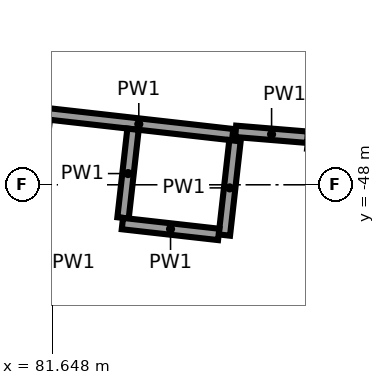
"""IFC4 building model, lengths in metres.
Left out: names, types, materials, properties, quantities, classifications, styles, units other than length and angle.
Written with IfcOpenShell. Run it as: python <this file> out.ifc"""

import sys

from ifc_helpers import new_model, si_unit, direction, frame, frame_2d, origin, place, context, subcontext, project, spatial, rectangle, extrude, element, save


model = new_model("IFC4")
c1 = context("Model", 3, precision=1e-05, world=origin(), true_north=direction((0.0, 1.0)))
c2 = subcontext(c1, "Body", "Model", "MODEL_VIEW")
j1 = project(units=[si_unit("LENGTHUNIT", "METRE"), si_unit("PLANEANGLEUNIT", "RADIAN")], contexts=[c1])
p1 = place(None, origin())
s1 = spatial("IfcSite", under=j1, at=p1, CompositionType="ELEMENT")
p2 = place(p1, origin())
s2 = spatial("IfcBuilding", under=s1, at=p2, CompositionType="ELEMENT")
p3 = place(p2, frame((0.0, 0.0, 18.0)))
s3 = spatial("IfcBuildingStorey", under=s2, at=p3, CompositionType="ELEMENT", Elevation=18.0)
p4 = place(p3, frame((84.023, -47.341, 0.0), z_axis=(0.0, 0.0, 1.0), x_axis=(-0.993701549417, 0.112059049998, 0.0)))
e1 = element("IfcWall", 1, at=p4, inside=s3, PredefinedType="PARTITIONING", context=c2, shape_type="SweptSolid", body=[
    extrude(rectangle(XDim=2.486, YDim=0.15, at=frame_2d((1.243, 0.0))), origin(), (0.0, 0.0, 1.0), 5.6),
])
p5 = place(p3, frame((83.913, -48.662, 0.0), z_axis=(0.0, 0.0, 1.0), x_axis=(0.111804424032, 0.993730230378, 0.0)))
e2 = element("IfcWall", 2, at=p5, inside=s3, PredefinedType="PARTITIONING", context=c2, shape_type="SweptSolid", body=[
    extrude(rectangle(XDim=1.249, YDim=0.15, at=frame_2d((0.625, 0.0))), origin(), (0.0, 0.0, 1.0), 5.6),
])
p6 = place(p3, frame((82.712, -47.269, 0.0), z_axis=(0.0, 0.0, 1.0), x_axis=(-0.112097694808, -0.993697190707, 0.0)))
e3 = element("IfcWall", 3, at=p6, inside=s3, PredefinedType="PARTITIONING", context=c2, shape_type="SweptSolid", body=[
    extrude(rectangle(XDim=1.174, YDim=0.15, at=frame_2d((0.587, 0.0))), origin(), (0.0, 0.0, 1.0), 5.6),
])
p7 = place(p3, frame((82.572, -48.51, 0.0), z_axis=(0.0, 0.0, 1.0), x_axis=(0.993726262285, -0.111839687257, 0.0)))
e4 = element("IfcWall", 4, at=p7, inside=s3, PredefinedType="PARTITIONING", context=c2, shape_type="SweptSolid", body=[
    extrude(rectangle(XDim=1.275, YDim=0.15, at=frame_2d((0.637, 0.0))), origin(), (0.0, 0.0, 1.0), 5.6),
])
p8 = place(p3, frame((85.007, -47.375, 0.0), z_axis=(0.0, 0.0, 1.0), x_axis=(-0.996639273542, 0.081915556729, 0.0)))
e5 = element("IfcWall", 5, at=p8, inside=s3, PredefinedType="PARTITIONING", context=c2, shape_type="SweptSolid", body=[
    extrude(rectangle(XDim=0.948, YDim=0.15, at=frame_2d((0.474, 0.0))), origin(), (0.0, 0.0, 1.0), 4.5),
])
save(model, sys.argv[1])
